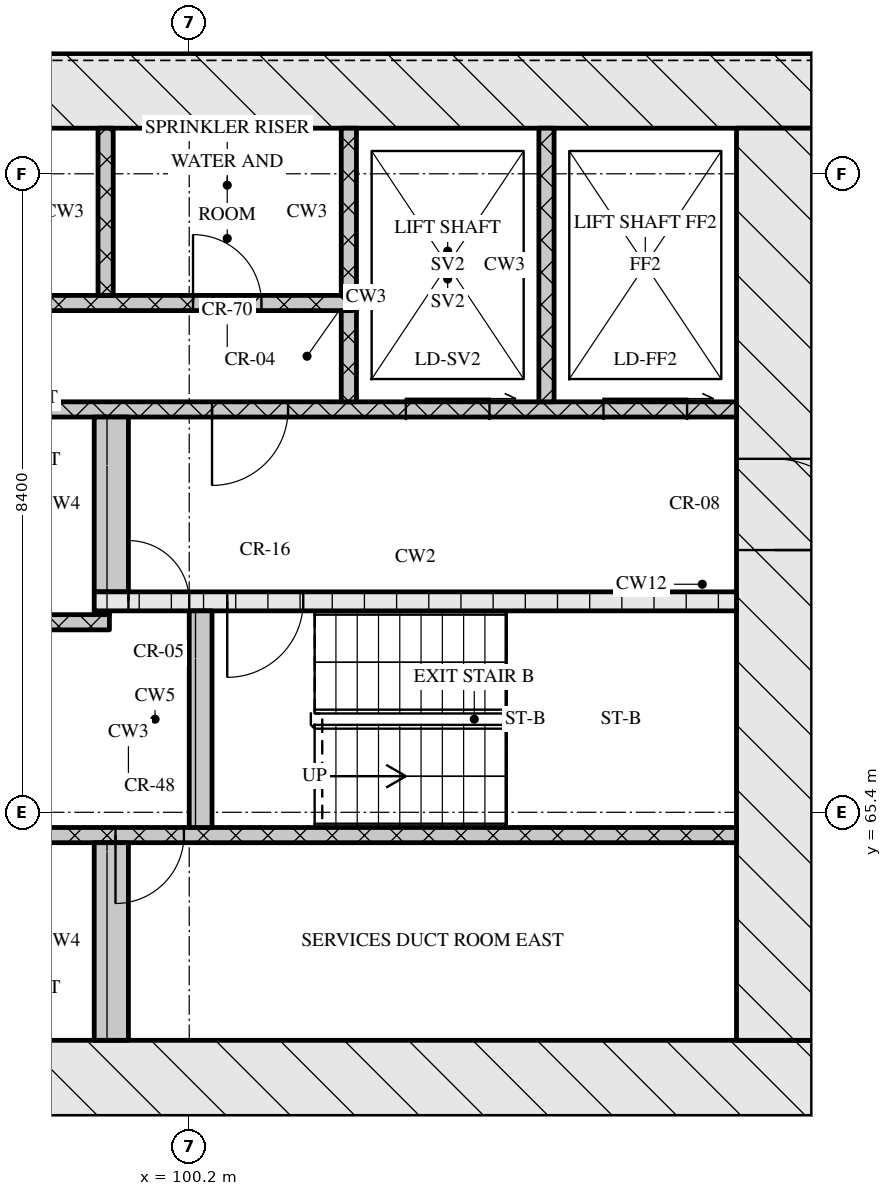
"""IFC4 building model, lengths in metres.
Left out: names, types, materials, properties, quantities, classifications, styles, units other than length and angle.
Written with IfcOpenShell. Run it as: python <this file> out.ifc"""

import sys

from ifc_helpers import new_model, si_unit, direction, frame, frame_2d, origin, place, context, subcontext, project, spatial, rectangle, extrude, element, fill, save


model = new_model("IFC4")
c1 = context("Model", 3, precision=1e-05, world=origin(), true_north=direction((0.0, 1.0)))
c2 = subcontext(c1, "Body", "Model", "MODEL_VIEW")
j1 = project(units=[si_unit("LENGTHUNIT", "METRE"), si_unit("PLANEANGLEUNIT", "RADIAN")], contexts=[c1])
p1 = place(None, origin())
s1 = spatial("IfcSite", under=j1, at=p1, CompositionType="ELEMENT")
p2 = place(p1, origin())
s2 = spatial("IfcBuilding", under=s1, at=p2, CompositionType="ELEMENT")
p3 = place(p2, frame((0.0, 0.0, 109.65)))
s3 = spatial("IfcBuildingStorey", under=s2, at=p3, CompositionType="ELEMENT", Elevation=109.65)
p4 = place(p3, frame((66.8, 61.9, 0.0), z_axis=(0.0, 0.0, 1.0), x_axis=(1.0, 0.0, 0.0)))
e1 = element("IfcWall", 1, at=p4, inside=s3, PredefinedType="SOLIDWALL", context=c2, shape_type="SweptSolid", body=[
    extrude(rectangle(XDim=41.6, YDim=1.0, at=frame_2d((20.8, 0.0))), origin(), (0.0, 0.0, 1.0), 3.32),
])
p5 = place(p4, frame((21.15, 0.0, 0.0)))
e2 = element("IfcOpeningElement", 2, at=p5, cuts=e1, PredefinedType="OPENING", context=c2, shape_type="SweptSolid", body=[
    extrude(rectangle(XDim=1.8, YDim=2.1, at=frame_2d((0.9, 1.05))), frame((0.0, 0.51, 0.0), z_axis=(0.0, -1.0, 0.0), x_axis=(1.0, 0.0, 0.0)), (0.0, 0.0, 1.0), 1.02),
])
p6 = place(p3, frame((66.8, 74.9, 0.0), z_axis=(0.0, 0.0, 1.0), x_axis=(1.0, 0.0, 0.0)))
e3 = element("IfcWall", 3, at=p6, inside=s3, PredefinedType="SOLIDWALL", context=c2, shape_type="SweptSolid", body=[
    extrude(rectangle(XDim=41.6, YDim=1.0, at=frame_2d((20.8, 0.0))), origin(), (0.0, 0.0, 1.0), 3.32),
])
p7 = place(p3, frame((107.9, 62.4, 0.0), z_axis=(0.0, 0.0, 1.0), x_axis=(0.0, 1.0, 0.0)))
e4 = element("IfcWall", 4, at=p7, inside=s3, PredefinedType="SOLIDWALL", context=c2, shape_type="SweptSolid", body=[
    extrude(rectangle(XDim=12.0, YDim=1.0, at=frame_2d((6.0, 0.0))), origin(), (0.0, 0.0, 1.0), 3.32),
])
p8 = place(p7, frame((6.45, 0.0, 0.0)))
e5 = element("IfcOpeningElement", 5, at=p8, cuts=e4, PredefinedType="OPENING", context=c2, shape_type="SweptSolid", body=[
    extrude(rectangle(XDim=1.2, YDim=2.1, at=frame_2d((0.6, 1.05))), frame((0.0, 0.51, 0.0), z_axis=(0.0, -1.0, 0.0), x_axis=(1.0, 0.0, 0.0)), (0.0, 0.0, 1.0), 1.02),
])
p9 = place(p3, frame((99.175, 62.4, 0.0), z_axis=(0.0, 0.0, 1.0), x_axis=(0.0, 1.0, 0.0)))
e6 = element("IfcWall", 6, at=p9, inside=s3, PredefinedType="SOLIDWALL", context=c2, shape_type="SweptSolid", body=[
    extrude(rectangle(XDim=2.6, YDim=0.45, at=frame_2d((1.3, 0.0))), origin(), (0.0, 0.0, 1.0), 3.32),
])
p10 = place(p3, frame((91.4, 65.1, 0.0), z_axis=(0.0, 0.0, 1.0), x_axis=(1.0, 0.0, 0.0)))
e7 = element("IfcWall", 7, at=p10, inside=s3, PredefinedType="SOLIDWALL", context=c2, shape_type="SweptSolid", body=[
    extrude(rectangle(XDim=16.0, YDim=0.2, at=frame_2d((8.0, 0.0))), origin(), (0.0, 0.0, 1.0), 3.32),
])
p11 = place(p10, frame((7.83, 0.0, 0.0)))
e8 = element("IfcOpeningElement", 8, at=p11, cuts=e7, PredefinedType="OPENING", context=c2, shape_type="SweptSolid", body=[
    extrude(rectangle(XDim=0.9, YDim=2.1, at=frame_2d((0.45, 1.05))), frame((0.0, 0.11, 0.0), z_axis=(0.0, -1.0, 0.0), x_axis=(1.0, 0.0, 0.0)), (0.0, 0.0, 1.0), 0.22),
])
p12 = place(p3, frame((100.35, 65.2, 0.0), z_axis=(0.0, 0.0, 1.0), x_axis=(0.0, 1.0, 0.0)))
e9 = element("IfcWall", 9, at=p12, inside=s3, PredefinedType="SOLIDWALL", context=c2, shape_type="SweptSolid", body=[
    extrude(rectangle(XDim=2.85, YDim=0.3, at=frame_2d((1.425, 0.0))), origin(), (0.0, 0.0, 1.0), 3.32),
])
p13 = place(p3, frame((76.05, 67.9, 0.0), z_axis=(0.0, 0.0, 1.0), x_axis=(1.0, 0.0, 0.0)))
e10 = element("IfcWall", 10, at=p13, inside=s3, PredefinedType="SOLIDWALL", context=c2, shape_type="SweptSolid", body=[
    extrude(rectangle(XDim=23.1, YDim=0.2, at=frame_2d((11.55, 0.0))), origin(), (0.0, 0.0, 1.0), 3.32),
])
p14 = place(p13, frame((0.6, 0.0, 0.0)))
e11 = element("IfcOpeningElement", 11, at=p14, cuts=e10, PredefinedType="OPENING", context=c2, shape_type="SweptSolid", body=[
    extrude(rectangle(XDim=1.1, YDim=2.1, at=frame_2d((0.55, 1.05))), frame((0.0, 0.11, 0.0), z_axis=(0.0, -1.0, 0.0), x_axis=(1.0, 0.0, 0.0)), (0.0, 0.0, 1.0), 0.22),
])
p15 = place(p13, frame((3.1, 0.0, 0.0)))
e12 = element("IfcOpeningElement", 12, at=p15, cuts=e10, PredefinedType="OPENING", context=c2, shape_type="SweptSolid", body=[
    extrude(rectangle(XDim=1.1, YDim=2.1, at=frame_2d((0.55, 1.05))), frame((0.0, 0.11, 0.0), z_axis=(0.0, -1.0, 0.0), x_axis=(1.0, 0.0, 0.0)), (0.0, 0.0, 1.0), 0.22),
])
p16 = place(p13, frame((5.6, 0.0, 0.0)))
e13 = element("IfcOpeningElement", 13, at=p16, cuts=e10, PredefinedType="OPENING", context=c2, shape_type="SweptSolid", body=[
    extrude(rectangle(XDim=1.1, YDim=2.1, at=frame_2d((0.55, 1.05))), frame((0.0, 0.11, 0.0), z_axis=(0.0, -1.0, 0.0), x_axis=(1.0, 0.0, 0.0)), (0.0, 0.0, 1.0), 0.22),
])
p17 = place(p13, frame((9.7, 0.0, 0.0)))
e14 = element("IfcOpeningElement", 14, at=p17, cuts=e10, PredefinedType="OPENING", context=c2, shape_type="SweptSolid", body=[
    extrude(rectangle(XDim=0.9, YDim=2.1, at=frame_2d((0.45, 1.05))), frame((0.0, 0.11, 0.0), z_axis=(0.0, -1.0, 0.0), x_axis=(1.0, 0.0, 0.0)), (0.0, 0.0, 1.0), 0.22),
])
p18 = place(p13, frame((13.55, 0.0, 0.0)))
e15 = element("IfcOpeningElement", 15, at=p18, cuts=e10, PredefinedType="OPENING", context=c2, shape_type="SweptSolid", body=[
    extrude(rectangle(XDim=1.0, YDim=2.1, at=frame_2d((0.5, 1.05))), frame((0.0, 0.11, 0.0), z_axis=(0.0, -1.0, 0.0), x_axis=(1.0, 0.0, 0.0)), (0.0, 0.0, 1.0), 0.22),
])
p19 = place(p3, frame((98.95, 68.025, 0.0), z_axis=(0.0, 0.0, 1.0), x_axis=(1.0, 0.0, 0.0)))
e16 = element("IfcWall", 16, at=p19, inside=s3, PredefinedType="SOLIDWALL", context=c2, shape_type="SweptSolid", body=[
    extrude(rectangle(XDim=0.2, YDim=0.05, at=frame_2d((0.1, 0.0))), origin(), (0.0, 0.0, 1.0), 3.32),
])
p20 = place(p3, frame((98.95, 68.175, 0.0), z_axis=(0.0, 0.0, 1.0), x_axis=(1.0, 0.0, 0.0)))
e17 = element("IfcWall", 17, at=p20, inside=s3, PredefinedType="SOLIDWALL", context=c2, shape_type="SweptSolid", body=[
    extrude(rectangle(XDim=8.45, YDim=0.25, at=frame_2d((4.225, 0.0))), origin(), (0.0, 0.0, 1.0), 3.32),
])
p21 = place(p20, frame((0.45, 0.0, 0.0)))
e18 = element("IfcOpeningElement", 18, at=p21, cuts=e17, PredefinedType="OPENING", context=c2, shape_type="SweptSolid", body=[
    extrude(rectangle(XDim=0.8, YDim=2.1, at=frame_2d((0.4, 1.05))), frame((0.0, 0.135, 0.0), z_axis=(0.0, -1.0, 0.0), x_axis=(1.0, 0.0, 0.0)), (0.0, 0.0, 1.0), 0.27),
])
p22 = place(p20, frame((1.75, 0.0, 0.0)))
e19 = element("IfcOpeningElement", 19, at=p22, cuts=e17, PredefinedType="OPENING", context=c2, shape_type="SweptSolid", body=[
    extrude(rectangle(XDim=1.0, YDim=2.1, at=frame_2d((0.5, 1.05))), frame((0.0, 0.135, 0.0), z_axis=(0.0, -1.0, 0.0), x_axis=(1.0, 0.0, 0.0)), (0.0, 0.0, 1.0), 0.27),
])
p23 = place(p3, frame((99.175, 68.3, 0.0), z_axis=(0.0, 0.0, 1.0), x_axis=(0.0, 1.0, 0.0)))
e20 = element("IfcWall", 20, at=p23, inside=s3, PredefinedType="SOLIDWALL", context=c2, shape_type="SweptSolid", body=[
    extrude(rectangle(XDim=2.3, YDim=0.45, at=frame_2d((1.15, 0.0))), origin(), (0.0, 0.0, 1.0), 3.32),
])
p24 = place(p3, frame((67.8, 70.7, 0.0), z_axis=(0.0, 0.0, 1.0), x_axis=(1.0, 0.0, 0.0)))
e21 = element("IfcWall", 21, at=p24, inside=s3, PredefinedType="SOLIDWALL", context=c2, shape_type="SweptSolid", body=[
    extrude(rectangle(XDim=39.6, YDim=0.2, at=frame_2d((19.8, 0.0))), origin(), (0.0, 0.0, 1.0), 3.32),
])
p25 = place(p24, frame((0.65, 0.0, 0.0)))
e22 = element("IfcOpeningElement", 22, at=p25, cuts=e21, PredefinedType="OPENING", context=c2, shape_type="SweptSolid", body=[
    extrude(rectangle(XDim=1.1, YDim=2.1, at=frame_2d((0.55, 1.05))), frame((0.0, 0.11, 0.0), z_axis=(0.0, -1.0, 0.0), x_axis=(1.0, 0.0, 0.0)), (0.0, 0.0, 1.0), 0.22),
])
p26 = place(p24, frame((3.25, 0.0, 0.0)))
e23 = element("IfcOpeningElement", 23, at=p26, cuts=e21, PredefinedType="OPENING", context=c2, shape_type="SweptSolid", body=[
    extrude(rectangle(XDim=1.1, YDim=2.1, at=frame_2d((0.55, 1.05))), frame((0.0, 0.11, 0.0), z_axis=(0.0, -1.0, 0.0), x_axis=(1.0, 0.0, 0.0)), (0.0, 0.0, 1.0), 0.22),
])
p27 = place(p24, frame((5.9, 0.0, 0.0)))
e24 = element("IfcOpeningElement", 24, at=p27, cuts=e21, PredefinedType="OPENING", context=c2, shape_type="SweptSolid", body=[
    extrude(rectangle(XDim=1.0, YDim=2.1, at=frame_2d((0.5, 1.05))), frame((0.0, 0.11, 0.0), z_axis=(0.0, -1.0, 0.0), x_axis=(1.0, 0.0, 0.0)), (0.0, 0.0, 1.0), 0.22),
])
p28 = place(p24, frame((21.7, 0.0, 0.0)))
e25 = element("IfcOpeningElement", 25, at=p28, cuts=e21, PredefinedType="OPENING", context=c2, shape_type="SweptSolid", body=[
    extrude(rectangle(XDim=1.0, YDim=2.1, at=frame_2d((0.5, 1.05))), frame((0.0, 0.11, 0.0), z_axis=(0.0, -1.0, 0.0), x_axis=(1.0, 0.0, 0.0)), (0.0, 0.0, 1.0), 0.22),
])
p29 = place(p24, frame((32.7, 0.0, 0.0)))
e26 = element("IfcOpeningElement", 26, at=p29, cuts=e21, PredefinedType="OPENING", context=c2, shape_type="SweptSolid", body=[
    extrude(rectangle(XDim=1.0, YDim=2.1, at=frame_2d((0.5, 1.05))), frame((0.0, 0.11, 0.0), z_axis=(0.0, -1.0, 0.0), x_axis=(1.0, 0.0, 0.0)), (0.0, 0.0, 1.0), 0.22),
])
p30 = place(p24, frame((35.25, 0.0, 0.0)))
e27 = element("IfcOpeningElement", 27, at=p30, cuts=e21, PredefinedType="OPENING", context=c2, shape_type="SweptSolid", body=[
    extrude(rectangle(XDim=1.1, YDim=2.1, at=frame_2d((0.55, 1.05))), frame((0.0, 0.11, 0.0), z_axis=(0.0, -1.0, 0.0), x_axis=(1.0, 0.0, 0.0)), (0.0, 0.0, 1.0), 0.22),
])
p31 = place(p24, frame((37.85, 0.0, 0.0)))
e28 = element("IfcOpeningElement", 28, at=p31, cuts=e21, PredefinedType="OPENING", context=c2, shape_type="SweptSolid", body=[
    extrude(rectangle(XDim=1.1, YDim=2.1, at=frame_2d((0.55, 1.05))), frame((0.0, 0.11, 0.0), z_axis=(0.0, -1.0, 0.0), x_axis=(1.0, 0.0, 0.0)), (0.0, 0.0, 1.0), 0.22),
])
p32 = place(p3, frame((102.3, 70.8, 0.0), z_axis=(0.0, 0.0, 1.0), x_axis=(0.0, 1.0, 0.0)))
e29 = element("IfcWall", 29, at=p32, inside=s3, PredefinedType="SOLIDWALL", context=c2, shape_type="SweptSolid", body=[
    extrude(rectangle(XDim=1.2, YDim=0.2, at=frame_2d((0.6, 0.0))), origin(), (0.0, 0.0, 1.0), 3.32),
])
p33 = place(p3, frame((104.9, 70.8, 0.0), z_axis=(0.0, 0.0, 1.0), x_axis=(0.0, 1.0, 0.0)))
e30 = element("IfcWall", 30, at=p33, inside=s3, PredefinedType="SOLIDWALL", context=c2, shape_type="SweptSolid", body=[
    extrude(rectangle(XDim=3.6, YDim=0.2, at=frame_2d((1.8, 0.0))), origin(), (0.0, 0.0, 1.0), 3.32),
])
p34 = place(p3, frame((90.7, 72.1, 0.0), z_axis=(0.0, 0.0, 1.0), x_axis=(1.0, 0.0, 0.0)))
e31 = element("IfcWall", 31, at=p34, inside=s3, PredefinedType="SOLIDWALL", context=c2, shape_type="SweptSolid", body=[
    extrude(rectangle(XDim=11.7, YDim=0.2, at=frame_2d((5.85, 0.0))), origin(), (0.0, 0.0, 1.0), 3.32),
])
p35 = place(p34, frame((1.6, 0.0, 0.0)))
e32 = element("IfcOpeningElement", 32, at=p35, cuts=e31, PredefinedType="OPENING", context=c2, shape_type="SweptSolid", body=[
    extrude(rectangle(XDim=0.9, YDim=2.1, at=frame_2d((0.45, 1.05))), frame((0.0, 0.11, 0.0), z_axis=(0.0, -1.0, 0.0), x_axis=(1.0, 0.0, 0.0)), (0.0, 0.0, 1.0), 0.22),
])
p36 = place(p34, frame((5.335, 0.0, 0.0)))
e33 = element("IfcOpeningElement", 33, at=p36, cuts=e31, PredefinedType="OPENING", context=c2, shape_type="SweptSolid", body=[
    extrude(rectangle(XDim=0.9, YDim=2.1, at=frame_2d((0.45, 1.05))), frame((0.0, 0.11, 0.0), z_axis=(0.0, -1.0, 0.0), x_axis=(1.0, 0.0, 0.0)), (0.0, 0.0, 1.0), 0.22),
])
p37 = place(p34, frame((9.55, 0.0, 0.0)))
e34 = element("IfcOpeningElement", 34, at=p37, cuts=e31, PredefinedType="OPENING", context=c2, shape_type="SweptSolid", body=[
    extrude(rectangle(XDim=0.9, YDim=2.1, at=frame_2d((0.45, 1.05))), frame((0.0, 0.11, 0.0), z_axis=(0.0, -1.0, 0.0), x_axis=(1.0, 0.0, 0.0)), (0.0, 0.0, 1.0), 0.22),
])
for number, where, z_axis, x_axis in (
    (35, (99.1, 72.2, 0.0), (0.0, 0.0, 1.0), (0.0, 1.0, 0.0)),
    (36, (102.3, 72.2, 0.0), (0.0, 0.0, 1.0), (0.0, 1.0, 0.0)),
):
    element("IfcWall", number, at=place(p3, frame(where, z_axis=z_axis, x_axis=x_axis)), inside=s3, PredefinedType="SOLIDWALL", context=c2, shape_type="SweptSolid", body=[
        extrude(rectangle(XDim=2.2, YDim=0.2, at=frame_2d((1.1, 0.0))), origin(), (0.0, 0.0, 1.0), 3.32),
    ])
p38 = place(p11, origin())
e37 = element("IfcDoor", 37, at=p38, inside=s3, OperationType="SINGLE_SWING_RIGHT", PredefinedType="DOOR", context=c2, shape_type="SweptSolid", body=[
    extrude(rectangle(XDim=0.9, YDim=2.1, at=frame_2d((0.45, 1.05))), frame((0.0, 0.025, 0.0), z_axis=(0.0, -1.0, 0.0), x_axis=(1.0, 0.0, 0.0)), (0.0, 0.0, 1.0), 0.05),
])
fill(e8, e37)
p39 = place(p21, origin())
e38 = element("IfcDoor", 38, at=p39, inside=s3, OperationType="SINGLE_SWING_LEFT", PredefinedType="DOOR", context=c2, shape_type="SweptSolid", body=[
    extrude(rectangle(XDim=0.8, YDim=2.1, at=frame_2d((0.4, 1.05))), frame((0.0, 0.025, 0.0), z_axis=(0.0, -1.0, 0.0), x_axis=(1.0, 0.0, 0.0)), (0.0, 0.0, 1.0), 0.05),
])
fill(e18, e38)
p40 = place(p22, origin())
e39 = element("IfcDoor", 39, at=p40, inside=s3, OperationType="SINGLE_SWING_RIGHT", PredefinedType="DOOR", context=c2, shape_type="SweptSolid", body=[
    extrude(rectangle(XDim=1.0, YDim=2.1, at=frame_2d((0.5, 1.05))), frame((0.0, 0.025, 0.0), z_axis=(0.0, -1.0, 0.0), x_axis=(1.0, 0.0, 0.0)), (0.0, 0.0, 1.0), 0.05),
])
fill(e19, e39)
p41 = place(p8, origin())
e40 = element("IfcDoor", 40, at=p41, inside=s3, OperationType="SINGLE_SWING_RIGHT", PredefinedType="DOOR", context=c2, shape_type="SweptSolid", body=[
    extrude(rectangle(XDim=1.2, YDim=2.1, at=frame_2d((0.6, 1.05))), frame((0.0, 0.025, 0.0), z_axis=(0.0, -1.0, 0.0), x_axis=(1.0, 0.0, 0.0)), (0.0, 0.0, 1.0), 0.05),
])
fill(e5, e40)
p42 = place(p29, origin())
e41 = element("IfcDoor", 41, at=p42, inside=s3, OperationType="SINGLE_SWING_RIGHT", PredefinedType="DOOR", context=c2, shape_type="SweptSolid", body=[
    extrude(rectangle(XDim=1.0, YDim=2.1, at=frame_2d((0.5, 1.05))), frame((0.0, 0.025, 0.0), z_axis=(0.0, -1.0, 0.0), x_axis=(1.0, 0.0, 0.0)), (0.0, 0.0, 1.0), 0.05),
])
fill(e26, e41)
p43 = place(p30, origin())
e42 = element("IfcDoor", 42, at=p43, inside=s3, OperationType="SLIDING_TO_RIGHT", PredefinedType="DOOR", context=c2, shape_type="SweptSolid", body=[
    extrude(rectangle(XDim=1.1, YDim=2.1, at=frame_2d((0.55, 1.05))), frame((0.0, 0.025, 0.0), z_axis=(0.0, -1.0, 0.0), x_axis=(1.0, 0.0, 0.0)), (0.0, 0.0, 1.0), 0.05),
])
fill(e27, e42)
p44 = place(p31, origin())
e43 = element("IfcDoor", 43, at=p44, inside=s3, OperationType="SLIDING_TO_RIGHT", PredefinedType="DOOR", context=c2, shape_type="SweptSolid", body=[
    extrude(rectangle(XDim=1.1, YDim=2.1, at=frame_2d((0.55, 1.05))), frame((0.0, 0.025, 0.0), z_axis=(0.0, -1.0, 0.0), x_axis=(1.0, 0.0, 0.0)), (0.0, 0.0, 1.0), 0.05),
])
fill(e28, e43)
p45 = place(p37, origin())
e44 = element("IfcDoor", 44, at=p45, inside=s3, OperationType="SINGLE_SWING_LEFT", PredefinedType="DOOR", context=c2, shape_type="SweptSolid", body=[
    extrude(rectangle(XDim=0.9, YDim=2.1, at=frame_2d((0.45, 1.05))), frame((0.0, 0.025, 0.0), z_axis=(0.0, -1.0, 0.0), x_axis=(1.0, 0.0, 0.0)), (0.0, 0.0, 1.0), 0.05),
])
fill(e34, e44)
save(model, sys.argv[1])
